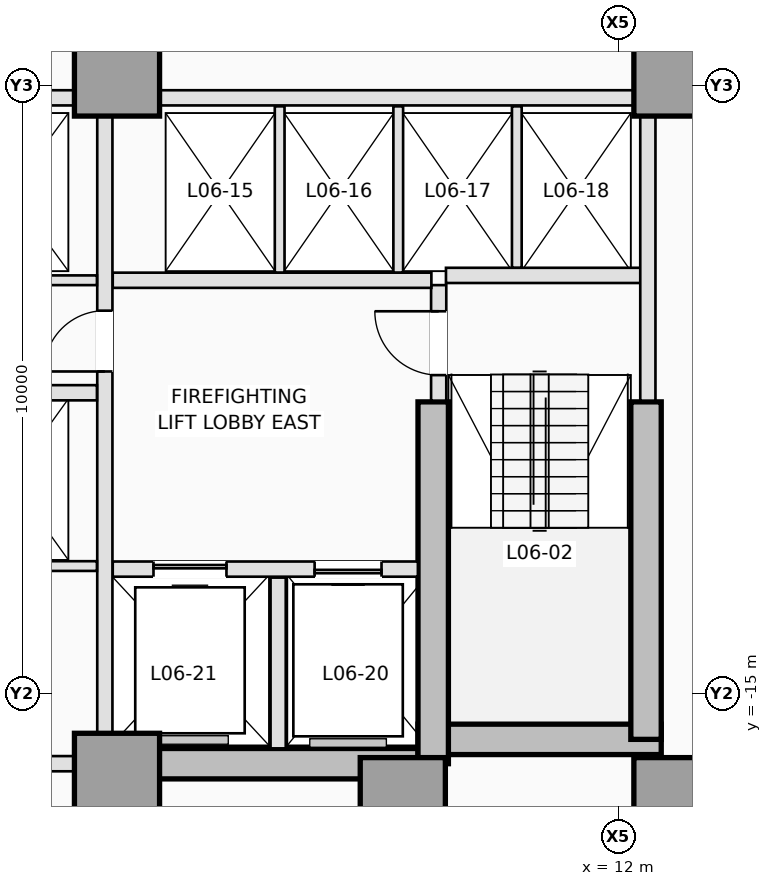
"""IFC4 building model, lengths in metres.
Left out: names, types, materials, properties, quantities, classifications, styles, units other than length and angle.
Written with IfcOpenShell. Run it as: python <this file> out.ifc"""

import sys

from ifc_helpers import new_model, si_unit, direction, frame, frame_2d, origin, origin_2d, place, context, subcontext, project, spatial, rectangle, extrude, element, fill, save


model = new_model("IFC4")
c1 = context("Model", 3, precision=1e-05, world=origin(), true_north=direction((0.0, 1.0)))
c2 = subcontext(c1, "Body", "Model", "MODEL_VIEW")
j1 = project(units=[si_unit("LENGTHUNIT", "METRE"), si_unit("PLANEANGLEUNIT", "RADIAN")], contexts=[c1])
p1 = place(None, origin())
s1 = spatial("IfcSite", under=j1, at=p1, CompositionType="ELEMENT")
p2 = place(p1, origin())
s2 = spatial("IfcBuilding", under=s1, at=p2, CompositionType="ELEMENT")
p3 = place(p2, frame((0.0, 0.0, 27.6)))
s3 = spatial("IfcBuildingStorey", under=s2, at=p3, CompositionType="ELEMENT", Elevation=27.6)
p4 = place(p3, frame((3.75, -16.15, 0.0), z_axis=(0.0, 0.0, 1.0), x_axis=(1.0, 0.0, 0.0)))
e1 = element("IfcWall", 1, at=p4, inside=s3, PredefinedType="SHEAR", context=c2, shape_type="SweptSolid", body=[
    extrude(rectangle(XDim=5.2, YDim=0.5, at=frame_2d((2.6, 0.0))), origin(), (0.0, 0.0, 1.0), 3.5),
])
p5 = place(p3, frame((8.7, -15.75, 0.0), z_axis=(0.0, 0.0, 1.0), x_axis=(1.0, 0.0, 0.0)))
e2 = element("IfcWall", 2, at=p5, inside=s3, PredefinedType="SHEAR", context=c2, shape_type="SweptSolid", body=[
    extrude(rectangle(XDim=4.0, YDim=0.5, at=frame_2d((2.0, 0.0))), origin(), (0.0, 0.0, 1.0), 3.5),
])
p6 = place(p3, frame((12.45, -15.75, 0.0), z_axis=(0.0, 0.0, 1.0), x_axis=(0.0, 1.0, 0.0)))
e3 = element("IfcWall", 3, at=p6, inside=s3, PredefinedType="SHEAR", context=c2, shape_type="SweptSolid", body=[
    extrude(rectangle(XDim=5.55, YDim=0.5, at=frame_2d((2.775, 0.0))), origin(), (0.0, 0.0, 1.0), 3.5),
])
p7 = place(p3, frame((8.95, -16.15, 0.0), z_axis=(0.0, 0.0, 1.0), x_axis=(0.0, 1.0, 0.0)))
e4 = element("IfcWall", 4, at=p7, inside=s3, PredefinedType="SHEAR", context=c2, shape_type="SweptSolid", body=[
    extrude(rectangle(XDim=5.95, YDim=0.5, at=frame_2d((2.975, 0.0))), origin(), (0.0, 0.0, 1.0), 3.5),
])
for number, where, z_axis, x_axis in (
    (5, (3.75, -16.35, 0.0), (0.0, 0.0, 1.0), (1.0, 0.0, 0.0)),
    (6, (8.45, -16.75, 0.0), (0.0, 0.0, 1.0), (1.0, 0.0, 0.0)),
    (7, (12.95, -16.75, 0.0), (0.0, 0.0, 1.0), (1.0, 0.0, 0.0)),
    (8, (3.75, -4.8, 0.0), (0.0, 0.0, 1.0), (1.0, 0.0, 0.0)),
    (9, (12.95, -4.8, 0.0), (0.0, 0.0, 1.0), (1.0, 0.0, 0.0)),
):
    element("IfcColumn", number, at=place(p3, frame(where, z_axis=z_axis, x_axis=x_axis)), inside=s3, PredefinedType="COLUMN", context=c2, shape_type="SweptSolid", body=[
        extrude(rectangle(XDim=1.4, YDim=1.4, at=origin_2d()), origin(), (0.0, 0.0, 1.0), 3.5),
    ])
p8 = place(p3, frame((9.04, -10.18, 0.0), z_axis=(0.0, 0.0, 1.0), x_axis=(0.0, 1.0, 0.0)))
e10 = element("IfcWall", 10, at=p8, inside=s3, PredefinedType="PARTITIONING", context=c2, shape_type="SweptSolid", body=[
    extrude(rectangle(XDim=1.9, YDim=0.25, at=frame_2d((0.95, 0.0))), origin(), (0.0, 0.0, 1.0), 3.25),
])
p9 = place(p8, frame((0.42, 0.0, 0.0)))
e11 = element("IfcOpeningElement", 11, at=p9, cuts=e10, PredefinedType="OPENING", context=c2, shape_type="SweptSolid", body=[
    extrude(rectangle(XDim=1.05, YDim=2.15, at=frame_2d((0.525, 1.075))), frame((0.0, 0.135, 0.0), z_axis=(0.0, -1.0, 0.0), x_axis=(1.0, 0.0, 0.0)), (0.0, 0.0, 1.0), 0.27),
])
p10 = place(p3, frame((9.16, -8.12, 0.0), z_axis=(0.0, 0.0, 1.0), x_axis=(1.0, 0.0, 0.0)))
e12 = element("IfcWall", 12, at=p10, inside=s3, PredefinedType="PARTITIONING", context=c2, shape_type="SweptSolid", body=[
    extrude(rectangle(XDim=3.22, YDim=0.25, at=frame_2d((1.61, 0.0))), origin(), (0.0, 0.0, 1.0), 3.25),
])
p11 = place(p3, frame((12.48, -10.18, 0.0), z_axis=(0.0, 0.0, 1.0), x_axis=(0.0, 1.0, 0.0)))
e13 = element("IfcWall", 13, at=p11, inside=s3, PredefinedType="PARTITIONING", context=c2, shape_type="SweptSolid", body=[
    extrude(rectangle(XDim=4.678, YDim=0.25, at=frame_2d((2.339, 0.0))), origin(), (0.0, 0.0, 1.0), 3.25),
])
p12 = place(p3, frame((3.68, -12.95, 0.0), z_axis=(0.0, 0.0, 1.0), x_axis=(1.0, 0.0, 0.0)))
e14 = element("IfcWall", 14, at=p12, inside=s3, PredefinedType="PARTITIONING", context=c2, shape_type="SweptSolid", body=[
    extrude(rectangle(XDim=5.018, YDim=0.25, at=frame_2d((2.509, 0.0))), origin(), (0.0, 0.0, 1.0), 3.25),
])
p13 = place(p12, frame((3.32, 0.0, 0.0)))
e15 = element("IfcOpeningElement", 15, at=p13, cuts=e14, PredefinedType="OPENING", context=c2, shape_type="SweptSolid", body=[
    extrude(rectangle(XDim=1.1, YDim=2.15, at=frame_2d((0.55, 1.075))), frame((0.0, 0.135, 0.0), z_axis=(0.0, -1.0, 0.0), x_axis=(1.0, 0.0, 0.0)), (0.0, 0.0, 1.0), 0.27),
])
p14 = place(p12, frame((0.67, 0.0, 0.0)))
e16 = element("IfcOpeningElement", 16, at=p14, cuts=e14, PredefinedType="OPENING", context=c2, shape_type="SweptSolid", body=[
    extrude(rectangle(XDim=1.2, YDim=2.15, at=frame_2d((0.6, 1.075))), frame((0.0, 0.135, 0.0), z_axis=(0.0, -1.0, 0.0), x_axis=(1.0, 0.0, 0.0)), (0.0, 0.0, 1.0), 0.27),
])
p15 = place(p3, frame((6.4, -15.898, 0.0), z_axis=(0.0, 0.0, 1.0), x_axis=(0.0, 1.0, 0.0)))
e17 = element("IfcWall", 17, at=p15, inside=s3, PredefinedType="PARTITIONING", context=c2, shape_type="SweptSolid", body=[
    extrude(rectangle(XDim=2.808, YDim=0.25, at=frame_2d((1.404, 0.0))), origin(), (0.0, 0.0, 1.0), 3.25),
])
p16 = place(p3, frame((3.68, -8.2, 0.0), z_axis=(0.0, 0.0, 1.0), x_axis=(1.0, 0.0, 0.0)))
e18 = element("IfcWall", 18, at=p16, inside=s3, PredefinedType="PARTITIONING", context=c2, shape_type="SweptSolid", body=[
    extrude(rectangle(XDim=5.24, YDim=0.25, at=frame_2d((2.62, 0.0))), origin(), (0.0, 0.0, 1.0), 3.25),
])
p17 = place(p3, frame((3.55, -15.648, 0.0), z_axis=(0.0, 0.0, 1.0), x_axis=(0.0, 1.0, 0.0)))
e19 = element("IfcWall", 19, at=p17, inside=s3, PredefinedType="PARTITIONING", context=c2, shape_type="SweptSolid", body=[
    extrude(rectangle(XDim=10.146, YDim=0.25, at=frame_2d((5.073, 0.0))), origin(), (0.0, 0.0, 1.0), 3.25),
])
p18 = place(p17, frame((5.948, 0.0, 0.0)))
e20 = element("IfcOpeningElement", 20, at=p18, cuts=e19, PredefinedType="OPENING", context=c2, shape_type="SweptSolid", body=[
    extrude(rectangle(XDim=1.0, YDim=2.15, at=frame_2d((0.5, 1.075))), frame((0.0, 0.135, 0.0), z_axis=(0.0, -1.0, 0.0), x_axis=(1.0, 0.0, 0.0)), (0.0, 0.0, 1.0), 0.27),
])
p19 = place(p3, frame((4.452, -5.2, 0.0), z_axis=(0.0, 0.0, 1.0), x_axis=(1.0, 0.0, 0.0)))
e21 = element("IfcWall", 21, at=p19, inside=s3, PredefinedType="PARTITIONING", context=c2, shape_type="SweptSolid", body=[
    extrude(rectangle(XDim=7.796, YDim=0.25, at=frame_2d((3.898, 0.0))), origin(), (0.0, 0.0, 1.0), 3.25),
])
p20 = place(p3, frame((0.95, -5.2, 0.0), z_axis=(0.0, 0.0, 1.0), x_axis=(1.0, 0.0, 0.0)))
e22 = element("IfcWall", 22, at=p20, inside=s3, PredefinedType="PARTITIONING", context=c2, shape_type="SweptSolid", body=[
    extrude(rectangle(XDim=2.098, YDim=0.25, at=frame_2d((1.049, 0.0))), origin(), (0.0, 0.0, 1.0), 3.25),
])
for number, where, z_axis, x_axis in (
    (23, (6.425, -8.073, 0.0), (0.0, 0.0, 1.0), (0.0, 1.0, 0.0)),
    (24, (8.375, -8.073, 0.0), (0.0, 0.0, 1.0), (0.0, 1.0, 0.0)),
):
    element("IfcWall", number, at=place(p3, frame(where, z_axis=z_axis, x_axis=x_axis)), inside=s3, PredefinedType="PARTITIONING", context=c2, shape_type="SweptSolid", body=[
        extrude(rectangle(XDim=2.733, YDim=0.16, at=frame_2d((1.366, 0.0))), origin(), (0.0, 0.0, 1.0), 3.25),
    ])
p21 = place(p3, frame((10.325, -7.993, 0.0), z_axis=(0.0, 0.0, 1.0), x_axis=(0.0, 1.0, 0.0)))
e25 = element("IfcWall", 25, at=p21, inside=s3, PredefinedType="PARTITIONING", context=c2, shape_type="SweptSolid", body=[
    extrude(rectangle(XDim=2.653, YDim=0.16, at=frame_2d((1.326, 0.0))), origin(), (0.0, 0.0, 1.0), 3.25),
])
p22 = place(p3, frame((-3.048, -16.15, 0.0), z_axis=(0.0, 0.0, 1.0), x_axis=(1.0, 0.0, 0.0)))
e26 = element("IfcWall", 26, at=p22, inside=s3, PredefinedType="PARTITIONING", context=c2, shape_type="SweptSolid", body=[
    extrude(rectangle(XDim=6.096, YDim=0.25, at=frame_2d((3.048, 0.0))), origin(), (0.0, 0.0, 1.0), 2.3),
])
p23 = place(p3, frame((0.95, -8.2, 0.0), z_axis=(0.0, 0.0, 1.0), x_axis=(1.0, 0.0, 0.0)))
e27 = element("IfcWall", 27, at=p23, inside=s3, PredefinedType="PARTITIONING", context=c2, shape_type="SweptSolid", body=[
    extrude(rectangle(XDim=2.47, YDim=0.16, at=frame_2d((1.235, 0.0))), origin(), (0.0, 0.0, 1.0), 3.25),
])
p24 = place(p3, frame((0.95, -10.05, 0.0), z_axis=(0.0, 0.0, 1.0), x_axis=(1.0, 0.0, 0.0)))
e28 = element("IfcWall", 28, at=p24, inside=s3, PredefinedType="PARTITIONING", context=c2, shape_type="SweptSolid", body=[
    extrude(rectangle(XDim=2.47, YDim=0.25, at=frame_2d((1.235, 0.0))), origin(), (0.0, 0.0, 1.0), 3.25),
])
p25 = place(p3, frame((-3.42, -12.9, 0.0), z_axis=(0.0, 0.0, 1.0), x_axis=(1.0, 0.0, 0.0)))
e29 = element("IfcWall", 29, at=p25, inside=s3, PredefinedType="PARTITIONING", context=c2, shape_type="SweptSolid", body=[
    extrude(rectangle(XDim=6.84, YDim=0.16, at=frame_2d((3.42, 0.0))), origin(), (0.0, 0.0, 1.0), 3.25),
])
p26 = place(p25, frame((2.98, 0.0, 0.0)))
e30 = element("IfcOpeningElement", 30, at=p26, cuts=e29, PredefinedType="OPENING", context=c2, shape_type="SweptSolid", body=[
    extrude(rectangle(XDim=0.88, YDim=2.12, at=frame_2d((0.44, 1.06))), frame((0.0, 0.09, 0.0), z_axis=(0.0, -1.0, 0.0), x_axis=(1.0, 0.0, 0.0)), (0.0, 0.0, 1.0), 0.18),
])
p27 = place(p13, origin())
e31 = element("IfcDoor", 31, at=p27, inside=s3, OperationType="SLIDING_TO_RIGHT", PredefinedType="DOOR", context=c2, shape_type="SweptSolid", body=[
    extrude(rectangle(XDim=1.1, YDim=2.15, at=frame_2d((0.55, 1.075))), frame((0.0, 0.025, 0.0), z_axis=(0.0, -1.0, 0.0), x_axis=(1.0, 0.0, 0.0)), (0.0, 0.0, 1.0), 0.05),
])
fill(e15, e31)
p28 = place(p14, origin())
e32 = element("IfcDoor", 32, at=p28, inside=s3, OperationType="SLIDING_TO_LEFT", PredefinedType="DOOR", context=c2, shape_type="SweptSolid", body=[
    extrude(rectangle(XDim=1.2, YDim=2.15, at=frame_2d((0.6, 1.075))), frame((0.0, 0.025, 0.0), z_axis=(0.0, -1.0, 0.0), x_axis=(1.0, 0.0, 0.0)), (0.0, 0.0, 1.0), 0.05),
])
fill(e16, e32)
p29 = place(p9, origin())
e33 = element("IfcDoor", 33, at=p29, inside=s3, OperationType="SINGLE_SWING_RIGHT", PredefinedType="DOOR", context=c2, shape_type="SweptSolid", body=[
    extrude(rectangle(XDim=1.05, YDim=2.15, at=frame_2d((0.525, 1.075))), frame((0.0, 0.025, 0.0), z_axis=(0.0, -1.0, 0.0), x_axis=(1.0, 0.0, 0.0)), (0.0, 0.0, 1.0), 0.05),
])
fill(e11, e33)
p30 = place(p18, origin())
e34 = element("IfcDoor", 34, at=p30, inside=s3, OperationType="SINGLE_SWING_LEFT", PredefinedType="DOOR", context=c2, shape_type="SweptSolid", body=[
    extrude(rectangle(XDim=1.0, YDim=2.15, at=frame_2d((0.5, 1.075))), frame((0.0, 0.025, 0.0), z_axis=(0.0, -1.0, 0.0), x_axis=(1.0, 0.0, 0.0)), (0.0, 0.0, 1.0), 0.05),
])
fill(e20, e34)
save(model, sys.argv[1])
